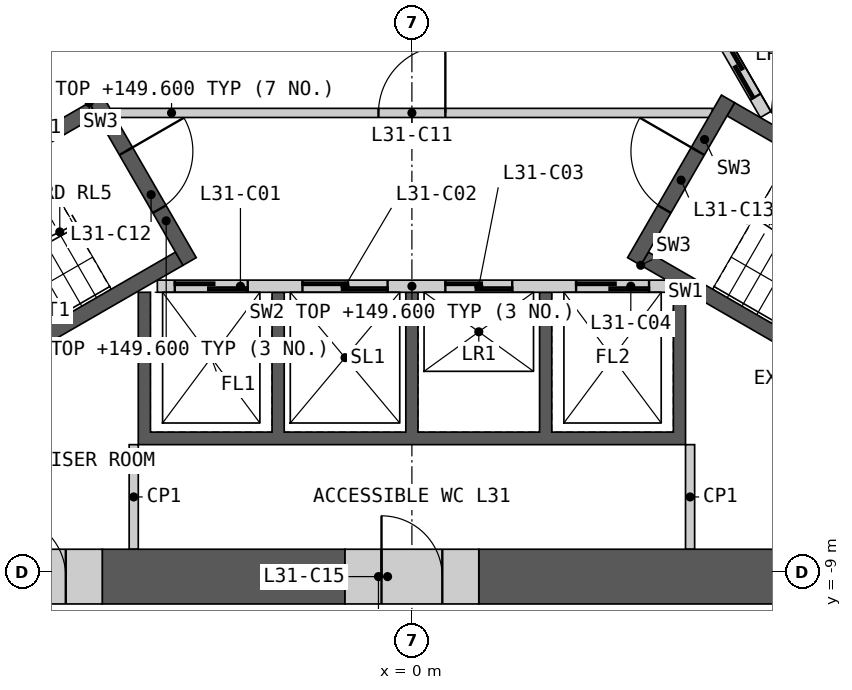
"""IFC4 building model, lengths in metres.
Left out: names, types, materials, properties, quantities, classifications, styles, units other than length and angle.
Written with IfcOpenShell. Run it as: python <this file> out.ifc"""

import sys

from ifc_helpers import new_model, si_unit, direction, frame, frame_2d, origin, place, context, subcontext, project, spatial, polyline, rectangle, outline, extrude, element, fill, save


model = new_model("IFC4")
c1 = context("Model", 3, precision=1e-05, world=origin(), true_north=direction((0.0, 1.0)))
c2 = subcontext(c1, "Body", "Model", "MODEL_VIEW")
j1 = project(units=[si_unit("LENGTHUNIT", "METRE"), si_unit("PLANEANGLEUNIT", "RADIAN")], contexts=[c1])
p1 = place(None, origin())
s1 = spatial("IfcSite", under=j1, at=p1, CompositionType="ELEMENT")
p2 = place(p1, origin())
s2 = spatial("IfcBuilding", under=s1, at=p2, CompositionType="ELEMENT")
p3 = place(p2, frame((0.0, 0.0, 145.8)))
s3 = spatial("IfcBuildingStorey", under=s2, at=p3, CompositionType="ELEMENT", Elevation=145.8)
p4 = place(p3, origin())
e1 = element("IfcWall", 1, at=p4, inside=s3, PredefinedType="SHEAR", context=c2, shape_type="SweptSolid", body=[
    extrude(outline(polyline([(4.5, -4.4), (4.5, -6.906), (-4.5, -6.906), (-4.5, -4.4), (-4.3, -4.4), (-4.3, -6.7), (-2.3, -6.7), (-2.3, -4.4), (-2.1, -4.4), (-2.1, -6.7), (-0.1, -6.7), (-0.1, -4.4), (0.1, -4.4), (0.1, -6.7), (2.1, -6.7), (2.1, -4.4), (2.3, -4.4), (2.3, -6.7), (4.3, -6.7), (4.3, -4.4), (4.5, -4.4)])), origin(), (0.0, 0.0, 1.0), 3.8),
])
p5 = place(p3, frame((-4.187, -4.3, 0.0), z_axis=(0.0, 0.0, 1.0), x_axis=(1.0, 0.0, 0.0)))
e2 = element("IfcWall", 2, at=p5, inside=s3, PredefinedType="SOLIDWALL", context=c2, shape_type="SweptSolid", body=[
    extrude(rectangle(XDim=8.373, YDim=0.2, at=frame_2d((4.187, 0.0))), origin(), (0.0, 0.0, 1.0), 3.8),
])
p6 = place(p5, frame((0.287, 0.0, 0.0)))
e3 = element("IfcOpeningElement", 3, at=p6, cuts=e2, PredefinedType="OPENING", context=c2, shape_type="SweptSolid", body=[
    extrude(rectangle(XDim=1.2, YDim=2.1, at=frame_2d((0.6, 1.05))), frame((0.0, 0.11, 0.0), z_axis=(0.0, -1.0, 0.0), x_axis=(1.0, 0.0, 0.0)), (0.0, 0.0, 1.0), 0.22),
])
p7 = place(p5, frame((2.387, 0.0, 0.0)))
e4 = element("IfcOpeningElement", 4, at=p7, cuts=e2, PredefinedType="OPENING", context=c2, shape_type="SweptSolid", body=[
    extrude(rectangle(XDim=1.4, YDim=2.1, at=frame_2d((0.7, 1.05))), frame((0.0, 0.11, 0.0), z_axis=(0.0, -1.0, 0.0), x_axis=(1.0, 0.0, 0.0)), (0.0, 0.0, 1.0), 0.22),
])
p8 = place(p5, frame((4.737, 0.0, 0.0)))
e5 = element("IfcOpeningElement", 5, at=p8, cuts=e2, PredefinedType="OPENING", context=c2, shape_type="SweptSolid", body=[
    extrude(rectangle(XDim=1.1, YDim=2.1, at=frame_2d((0.55, 1.05))), frame((0.0, 0.11, 0.0), z_axis=(0.0, -1.0, 0.0), x_axis=(1.0, 0.0, 0.0)), (0.0, 0.0, 1.0), 0.22),
])
p9 = place(p5, frame((6.887, 0.0, 0.0)))
e6 = element("IfcOpeningElement", 6, at=p9, cuts=e2, PredefinedType="OPENING", context=c2, shape_type="SweptSolid", body=[
    extrude(rectangle(XDim=1.2, YDim=2.1, at=frame_2d((0.6, 1.05))), frame((0.0, 0.11, 0.0), z_axis=(0.0, -1.0, 0.0), x_axis=(1.0, 0.0, 0.0)), (0.0, 0.0, 1.0), 0.22),
])
p10 = place(p3, origin())
e7 = element("IfcWall", 7, at=p10, inside=s3, PredefinedType="SHEAR", context=c2, shape_type="SweptSolid", body=[
    extrude(outline(polyline([(2.66, 4.192), (4.831, 5.445), (8.231, -0.444), (6.061, -1.697), (5.96, -1.524), (7.952, -0.374), (6.952, 1.358), (4.96, 0.208), (4.861, 0.381), (6.852, 1.531), (5.852, 3.263), (3.861, 2.113), (3.76, 2.287), (5.752, 3.437), (4.752, 5.169), (2.76, 4.019), (2.66, 4.192)])), origin(), (0.0, 0.0, 1.0), 3.8),
])
p11 = place(p3, frame((5.817, -1.476, 0.0), z_axis=(0.0, 0.0, 1.0), x_axis=(-0.500002616675, 0.866023893041, 0.0)))
e8 = element("IfcWall", 8, at=p11, inside=s3, PredefinedType="SOLIDWALL", context=c2, shape_type="SweptSolid", body=[
    extrude(rectangle(XDim=8.373, YDim=0.2, at=frame_2d((4.187, 0.0))), origin(), (0.0, 0.0, 1.0), 3.8),
])
p12 = place(p11, frame((0.337, 0.0, 0.0)))
e9 = element("IfcOpeningElement", 9, at=p12, cuts=e8, PredefinedType="OPENING", context=c2, shape_type="SweptSolid", body=[
    extrude(rectangle(XDim=1.1, YDim=2.1, at=frame_2d((0.55, 1.05))), frame((0.0, 0.11, 0.0), z_axis=(0.0, -1.0, 0.0), x_axis=(1.0, 0.0, 0.0)), (0.0, 0.0, 1.0), 0.22),
])
p13 = place(p11, frame((2.537, 0.0, 0.0)))
e10 = element("IfcOpeningElement", 10, at=p13, cuts=e8, PredefinedType="OPENING", context=c2, shape_type="SweptSolid", body=[
    extrude(rectangle(XDim=1.1, YDim=2.1, at=frame_2d((0.55, 1.05))), frame((0.0, 0.11, 0.0), z_axis=(0.0, -1.0, 0.0), x_axis=(1.0, 0.0, 0.0)), (0.0, 0.0, 1.0), 0.22),
])
p14 = place(p11, frame((4.737, 0.0, 0.0)))
e11 = element("IfcOpeningElement", 11, at=p14, cuts=e8, PredefinedType="OPENING", context=c2, shape_type="SweptSolid", body=[
    extrude(rectangle(XDim=1.1, YDim=2.1, at=frame_2d((0.55, 1.05))), frame((0.0, 0.11, 0.0), z_axis=(0.0, -1.0, 0.0), x_axis=(1.0, 0.0, 0.0)), (0.0, 0.0, 1.0), 0.22),
])
p15 = place(p11, frame((7.037, 0.0, 0.0)))
e12 = element("IfcOpeningElement", 12, at=p15, cuts=e8, PredefinedType="OPENING", context=c2, shape_type="SweptSolid", body=[
    extrude(rectangle(XDim=0.9, YDim=2.1, at=frame_2d((0.45, 1.05))), frame((0.0, 0.11, 0.0), z_axis=(0.0, -1.0, 0.0), x_axis=(1.0, 0.0, 0.0)), (0.0, 0.0, 1.0), 0.22),
])
p16 = place(p3, frame((-4.941, -1.45, 0.0), z_axis=(0.0, 0.0, 1.0), x_axis=(1.0, 0.0, 0.0)))
e13 = element("IfcWall", 13, at=p16, inside=s3, PredefinedType="PARTITIONING", context=c2, shape_type="SweptSolid", body=[
    extrude(rectangle(XDim=9.882, YDim=0.15, at=frame_2d((4.941, 0.0))), origin(), (0.0, 0.0, 1.0), 3.8),
])
p17 = place(p16, frame((4.391, 0.0, 0.0)))
e14 = element("IfcOpeningElement", 14, at=p17, cuts=e13, PredefinedType="OPENING", context=c2, shape_type="SweptSolid", body=[
    extrude(rectangle(XDim=1.1, YDim=2.1, at=frame_2d((0.55, 1.05))), frame((0.0, 0.085, 0.0), z_axis=(0.0, -1.0, 0.0), x_axis=(1.0, 0.0, 0.0)), (0.0, 0.0, 1.0), 0.17),
])
p18 = place(p3, origin())
e15 = element("IfcWall", 15, at=p18, inside=s3, PredefinedType="SHEAR", context=c2, shape_type="SweptSolid", body=[
    extrude(outline(polyline([(-5.307, -1.281), (-10.374, -4.206), (-10.032, -4.298), (-5.182, -1.498), (-5.307, -1.281)])), origin(), (0.0, 0.0, 1.0), 3.8),
])
p19 = place(p3, origin())
e16 = element("IfcWall", 16, at=p19, inside=s3, PredefinedType="SHEAR", context=c2, shape_type="SweptSolid", body=[
    extrude(outline(polyline([(-8.738, -6.539), (-8.83, -6.881), (-3.763, -3.956), (-3.888, -3.739), (-8.738, -6.539)])), origin(), (0.0, 0.0, 1.0), 3.8),
])
p20 = place(p3, frame((-5.199, -1.219, 0.0), z_axis=(0.0, 0.0, 1.0), x_axis=(0.499982516597, -0.866035497597, 0.0)))
e17 = element("IfcWall", 17, at=p20, inside=s3, PredefinedType="SHEAR", context=c2, shape_type="SweptSolid", body=[
    extrude(rectangle(XDim=3.088, YDim=0.25, at=frame_2d((1.544, 0.0))), origin(), (0.0, 0.0, 1.0), 3.8),
])
p21 = place(p20, frame((0.994, 0.0, 0.0)))
e18 = element("IfcOpeningElement", 18, at=p21, cuts=e17, PredefinedType="OPENING", context=c2, shape_type="SweptSolid", body=[
    extrude(rectangle(XDim=1.1, YDim=2.1, at=frame_2d((0.55, 1.05))), frame((0.0, 0.135, 0.0), z_axis=(0.0, -1.0, 0.0), x_axis=(1.0, 0.0, 0.0)), (0.0, 0.0, 1.0), 0.27),
])
p22 = place(p3, origin())
e19 = element("IfcWall", 19, at=p22, inside=s3, PredefinedType="SHEAR", context=c2, shape_type="SweptSolid", body=[
    extrude(outline(polyline([(3.763, -3.956), (8.83, -6.881), (8.738, -6.539), (3.888, -3.739), (3.763, -3.956)])), origin(), (0.0, 0.0, 1.0), 3.8),
])
p23 = place(p3, origin())
e20 = element("IfcWall", 20, at=p23, inside=s3, PredefinedType="SHEAR", context=c2, shape_type="SweptSolid", body=[
    extrude(outline(polyline([(10.032, -4.298), (10.374, -4.206), (5.307, -1.281), (5.182, -1.498), (10.032, -4.298)])), origin(), (0.0, 0.0, 1.0), 3.8),
])
p24 = place(p3, frame((3.655, -3.893, 0.0), z_axis=(0.0, 0.0, 1.0), x_axis=(0.499982516597, 0.866035497597, 0.0)))
e21 = element("IfcWall", 21, at=p24, inside=s3, PredefinedType="SHEAR", context=c2, shape_type="SweptSolid", body=[
    extrude(rectangle(XDim=3.088, YDim=0.25, at=frame_2d((1.544, 0.0))), origin(), (0.0, 0.0, 1.0), 3.8),
])
p25 = place(p24, frame((0.994, 0.0, 0.0)))
e22 = element("IfcOpeningElement", 22, at=p25, cuts=e21, PredefinedType="OPENING", context=c2, shape_type="SweptSolid", body=[
    extrude(rectangle(XDim=1.1, YDim=2.1, at=frame_2d((0.55, 1.05))), frame((0.0, 0.135, 0.0), z_axis=(0.0, -1.0, 0.0), x_axis=(1.0, 0.0, 0.0)), (0.0, 0.0, 1.0), 0.27),
])
for number, where, z_axis, x_axis in (
    (23, (4.575, -6.906, 0.0), (0.0, 0.0, 1.0), (0.0, -1.0, 0.0)),
    (24, (-4.575, -6.906, 0.0), (0.0, 0.0, 1.0), (0.0, -1.0, 0.0)),
):
    element("IfcWall", number, at=place(p3, frame(where, z_axis=z_axis, x_axis=x_axis)), inside=s3, PredefinedType="PARTITIONING", context=c2, shape_type="SweptSolid", body=[
        extrude(rectangle(XDim=1.72, YDim=0.15, at=frame_2d((0.86, 0.0))), origin(), (0.0, 0.0, 1.0), 3.8),
    ])
p26 = place(p3, frame((1.1, -9.076, 0.0), z_axis=(0.0, 0.0, 1.0), x_axis=(1.0, 0.0, 0.0)))
e25 = element("IfcWall", 25, at=p26, inside=s3, PredefinedType="SHEAR", context=c2, shape_type="SweptSolid", body=[
    extrude(rectangle(XDim=7.595, YDim=0.9, at=frame_2d((3.798, 0.0))), origin(), (0.0, 0.0, 1.0), 3.8),
])
p27 = place(p3, frame((-5.093, -9.076, 0.0), z_axis=(0.0, 0.0, 1.0), x_axis=(1.0, 0.0, 0.0)))
e26 = element("IfcWall", 26, at=p27, inside=s3, PredefinedType="SHEAR", context=c2, shape_type="SweptSolid", body=[
    extrude(rectangle(XDim=3.992, YDim=0.9, at=frame_2d((1.996, 0.0))), origin(), (0.0, 0.0, 1.0), 3.8),
])
p28 = place(p3, frame((-1.1, -9.076, 0.0), z_axis=(0.0, 0.0, 1.0), x_axis=(1.0, 0.0, 0.0)))
e27 = element("IfcWall", 27, at=p28, inside=s3, PredefinedType="SHEAR", context=c2, shape_type="SweptSolid", body=[
    extrude(rectangle(XDim=2.2, YDim=0.9, at=frame_2d((1.1, 0.0))), origin(), (0.0, 0.0, 1.0), 3.8),
])
p29 = place(p28, frame((0.6, 0.0, 0.0)))
e28 = element("IfcOpeningElement", 28, at=p29, cuts=e27, PredefinedType="OPENING", context=c2, shape_type="SweptSolid", body=[
    extrude(rectangle(XDim=1.0, YDim=2.1, at=frame_2d((0.5, 1.05))), frame((0.0, 0.46, 0.0), z_axis=(0.0, -1.0, 0.0), x_axis=(1.0, 0.0, 0.0)), (0.0, 0.0, 1.0), 0.92),
])
p30 = place(p3, frame((-7.292, -9.076, 0.0), z_axis=(0.0, 0.0, 1.0), x_axis=(1.0, 0.0, 0.0)))
e29 = element("IfcWall", 29, at=p30, inside=s3, PredefinedType="SHEAR", context=c2, shape_type="SweptSolid", body=[
    extrude(rectangle(XDim=2.2, YDim=0.9, at=frame_2d((1.1, 0.0))), origin(), (0.0, 0.0, 1.0), 3.8),
])
p31 = place(p30, frame((0.6, 0.0, 0.0)))
e30 = element("IfcOpeningElement", 30, at=p31, cuts=e29, PredefinedType="OPENING", context=c2, shape_type="SweptSolid", body=[
    extrude(rectangle(XDim=1.0, YDim=2.1, at=frame_2d((0.5, 1.05))), frame((0.0, 0.46, 0.0), z_axis=(0.0, -1.0, 0.0), x_axis=(1.0, 0.0, 0.0)), (0.0, 0.0, 1.0), 0.92),
])
p32 = place(p6, origin())
e31 = element("IfcDoor", 31, at=p32, inside=s3, OperationType="SLIDING_TO_LEFT", PredefinedType="DOOR", context=c2, shape_type="SweptSolid", body=[
    extrude(rectangle(XDim=1.2, YDim=2.1, at=frame_2d((0.6, 1.05))), frame((0.0, 0.025, 0.0), z_axis=(0.0, -1.0, 0.0), x_axis=(1.0, 0.0, 0.0)), (0.0, 0.0, 1.0), 0.05),
])
fill(e3, e31)
p33 = place(p7, origin())
e32 = element("IfcDoor", 32, at=p33, inside=s3, OperationType="SLIDING_TO_LEFT", PredefinedType="DOOR", context=c2, shape_type="SweptSolid", body=[
    extrude(rectangle(XDim=1.4, YDim=2.1, at=frame_2d((0.7, 1.05))), frame((0.0, 0.025, 0.0), z_axis=(0.0, -1.0, 0.0), x_axis=(1.0, 0.0, 0.0)), (0.0, 0.0, 1.0), 0.05),
])
fill(e4, e32)
p34 = place(p8, origin())
e33 = element("IfcDoor", 33, at=p34, inside=s3, OperationType="SLIDING_TO_LEFT", PredefinedType="DOOR", context=c2, shape_type="SweptSolid", body=[
    extrude(rectangle(XDim=1.1, YDim=2.1, at=frame_2d((0.55, 1.05))), frame((0.0, 0.025, 0.0), z_axis=(0.0, -1.0, 0.0), x_axis=(1.0, 0.0, 0.0)), (0.0, 0.0, 1.0), 0.05),
])
fill(e5, e33)
p35 = place(p9, origin())
e34 = element("IfcDoor", 34, at=p35, inside=s3, OperationType="SLIDING_TO_LEFT", PredefinedType="DOOR", context=c2, shape_type="SweptSolid", body=[
    extrude(rectangle(XDim=1.2, YDim=2.1, at=frame_2d((0.6, 1.05))), frame((0.0, 0.025, 0.0), z_axis=(0.0, -1.0, 0.0), x_axis=(1.0, 0.0, 0.0)), (0.0, 0.0, 1.0), 0.05),
])
fill(e6, e34)
p36 = place(p12, origin())
e35 = element("IfcDoor", 35, at=p36, inside=s3, OperationType="SLIDING_TO_LEFT", PredefinedType="DOOR", context=c2, shape_type="SweptSolid", body=[
    extrude(rectangle(XDim=1.1, YDim=2.1, at=frame_2d((0.55, 1.05))), frame((0.0, 0.025, 0.0), z_axis=(0.0, -1.0, 0.0), x_axis=(1.0, 0.0, 0.0)), (0.0, 0.0, 1.0), 0.05),
])
fill(e9, e35)
p37 = place(p17, origin())
e36 = element("IfcDoor", 36, at=p37, inside=s3, OperationType="SINGLE_SWING_RIGHT", PredefinedType="DOOR", context=c2, shape_type="SweptSolid", body=[
    extrude(rectangle(XDim=1.1, YDim=2.1, at=frame_2d((0.55, 1.05))), frame((0.0, 0.025, 0.0), z_axis=(0.0, -1.0, 0.0), x_axis=(1.0, 0.0, 0.0)), (0.0, 0.0, 1.0), 0.05),
])
fill(e14, e36)
p38 = place(p21, origin())
e37 = element("IfcDoor", 37, at=p38, inside=s3, OperationType="SINGLE_SWING_LEFT", PredefinedType="DOOR", context=c2, shape_type="SweptSolid", body=[
    extrude(rectangle(XDim=1.1, YDim=2.1, at=frame_2d((0.55, 1.05))), frame((0.0, 0.025, 0.0), z_axis=(0.0, -1.0, 0.0), x_axis=(1.0, 0.0, 0.0)), (0.0, 0.0, 1.0), 0.05),
])
fill(e18, e37)
p39 = place(p25, origin())
e38 = element("IfcDoor", 38, at=p39, inside=s3, OperationType="SINGLE_SWING_RIGHT", PredefinedType="DOOR", context=c2, shape_type="SweptSolid", body=[
    extrude(rectangle(XDim=1.1, YDim=2.1, at=frame_2d((0.55, 1.05))), frame((0.0, 0.025, 0.0), z_axis=(0.0, -1.0, 0.0), x_axis=(1.0, 0.0, 0.0)), (0.0, 0.0, 1.0), 0.05),
])
fill(e22, e38)
p40 = place(p29, origin())
e39 = element("IfcDoor", 39, at=p40, inside=s3, OperationType="SINGLE_SWING_LEFT", PredefinedType="DOOR", context=c2, shape_type="SweptSolid", body=[
    extrude(rectangle(XDim=1.0, YDim=2.1, at=frame_2d((0.5, 1.05))), frame((0.0, 0.205, 0.0), z_axis=(0.0, -1.0, 0.0), x_axis=(1.0, 0.0, 0.0)), (0.0, 0.0, 1.0), 0.05),
])
fill(e28, e39)
p41 = place(p31, origin())
e40 = element("IfcDoor", 40, at=p41, inside=s3, OperationType="SINGLE_SWING_LEFT", PredefinedType="DOOR", context=c2, shape_type="SweptSolid", body=[
    extrude(rectangle(XDim=1.0, YDim=2.1, at=frame_2d((0.5, 1.05))), frame((0.0, 0.205, 0.0), z_axis=(0.0, -1.0, 0.0), x_axis=(1.0, 0.0, 0.0)), (0.0, 0.0, 1.0), 0.05),
])
fill(e30, e40)
save(model, sys.argv[1])
